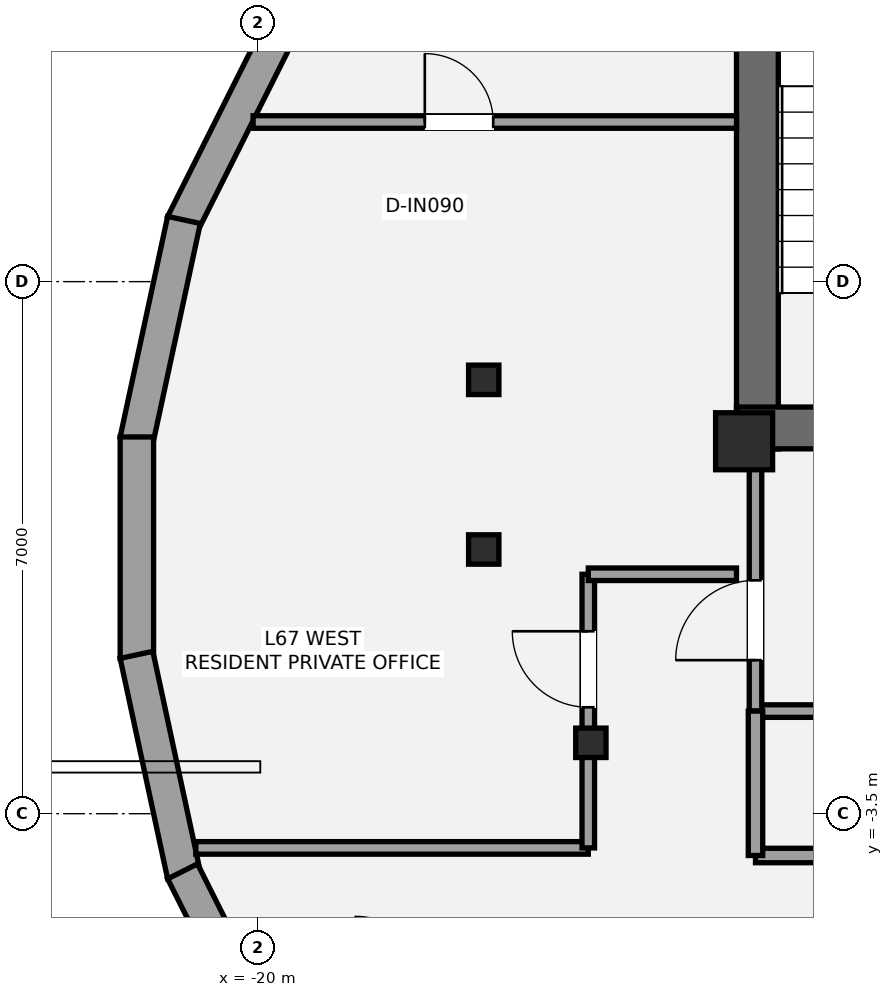
"""IFC4 building model, lengths in metres.
Left out: names, types, materials, properties, quantities, classifications, styles, units other than length and angle.
Written with IfcOpenShell. Run it as: python <this file> out.ifc"""

import sys

from ifc_helpers import new_model, si_unit, direction, frame, frame_2d, origin, origin_2d, place, context, subcontext, project, spatial, rectangle, i_section, extrude, element, fill, save


model = new_model("IFC4")
c1 = context("Model", 3, precision=1e-05, world=origin(), true_north=direction((0.0, 1.0)))
c2 = subcontext(c1, "Body", "Model", "MODEL_VIEW")
j1 = project(units=[si_unit("LENGTHUNIT", "METRE"), si_unit("PLANEANGLEUNIT", "RADIAN")], contexts=[c1])
p1 = place(None, origin())
s1 = spatial("IfcSite", under=j1, at=p1, CompositionType="ELEMENT")
p2 = place(p1, origin())
s2 = spatial("IfcBuilding", under=s1, at=p2, CompositionType="ELEMENT")
p3 = place(p2, frame((0.0, 0.0, 238.35)))
s3 = spatial("IfcBuildingStorey", under=s2, at=p3, CompositionType="ELEMENT", Elevation=238.35)
p4 = place(p3, frame((-13.425, 1.3, 0.0), z_axis=(0.0, 0.0, 1.0), x_axis=(0.0, 1.0, 0.0)))
e1 = element("IfcWall", 1, at=p4, inside=s3, PredefinedType="SHEAR", context=c2, shape_type="SweptSolid", body=[
    extrude(rectangle(XDim=8.25, YDim=0.55, at=frame_2d((4.125, 0.0))), origin(), (0.0, 0.0, 1.0), 3.15),
])
p5 = place(p3, frame((-4.925, 1.575, 0.0), z_axis=(0.0, 0.0, 1.0), x_axis=(-1.0, 0.0, 0.0)))
e2 = element("IfcWall", 2, at=p5, inside=s3, PredefinedType="SHEAR", context=c2, shape_type="SweptSolid", body=[
    extrude(rectangle(XDim=8.775, YDim=0.55, at=frame_2d((4.387, 0.0))), origin(), (0.0, 0.0, 1.0), 3.15),
])
p6 = place(p5, frame((5.375, 0.0, 0.0)))
e3 = element("IfcOpeningElement", 3, at=p6, cuts=e2, PredefinedType="OPENING", context=c2, shape_type="SweptSolid", body=[
    extrude(rectangle(XDim=1.05, YDim=2.15, at=frame_2d((0.525, 1.075))), frame((0.0, 0.285, 0.0), z_axis=(0.0, -1.0, 0.0), x_axis=(1.0, 0.0, 0.0)), (0.0, 0.0, 1.0), 0.57),
])
p7 = place(p5, frame((3.705, 0.0, 0.0)))
e4 = element("IfcOpeningElement", 4, at=p7, cuts=e2, PredefinedType="OPENING", context=c2, shape_type="SweptSolid", body=[
    extrude(rectangle(XDim=1.1, YDim=2.2, at=frame_2d((0.55, 1.1))), frame((0.0, 0.285, 0.0), z_axis=(0.0, -1.0, 0.0), x_axis=(1.0, 0.0, 0.0)), (0.0, 0.0, 1.0), 0.57),
])
p8 = place(p3, frame((-13.6, 1.4, 0.0), z_axis=(0.0, 0.0, 1.0), x_axis=(1.0, 0.0, 0.0)))
e5 = element("IfcColumn", 5, at=p8, inside=s3, PredefinedType="PILASTER", context=c2, shape_type="SweptSolid", body=[
    extrude(rectangle(XDim=0.75, YDim=0.75, at=origin_2d()), origin(), (0.0, 0.0, 1.0), 3.15),
])
for number, where, z_axis, x_axis in (
    (6, (-17.026, 2.208, 0.0), (0.0, 0.0, 1.0), (1.0, 0.0, 0.0)),
    (7, (-17.026, -0.024, 0.0), (0.0, 0.0, 1.0), (1.0, 0.0, 0.0)),
    (8, (-15.616, -2.567, 0.0), (0.0, 0.0, 1.0), (1.0, 0.0, 0.0)),
):
    element("IfcColumn", number, at=place(p3, frame(where, z_axis=z_axis, x_axis=x_axis)), inside=s3, PredefinedType="COLUMN", context=c2, shape_type="SweptSolid", body=[
        extrude(i_section(OverallWidth=0.399, OverallDepth=0.387, WebThickness=0.021, FlangeThickness=0.033, at=origin_2d()), origin(), (0.0, 0.0, 1.0), 3.15),
    ])
p9 = place(p3, frame((-20.988, 4.259, 0.0), z_axis=(0.0, 0.0, 1.0), x_axis=(0.448424724145, 0.893820601002, 0.0)))
e9 = element("IfcWall", 9, at=p9, inside=s3, PredefinedType="STANDARD", context=c2, shape_type="SweptSolid", body=[
    extrude(rectangle(XDim=3.144, YDim=0.44, at=frame_2d((1.572, 0.0))), origin(), (0.0, 0.0, 1.0), 2.336),
])
p10 = place(p3, frame((-21.594, 1.41, 0.0), z_axis=(0.0, 0.0, 1.0), x_axis=(0.210540350534, 0.977585168053, 0.0)))
e10 = element("IfcWall", 10, at=p10, inside=s3, PredefinedType="STANDARD", context=c2, shape_type="SweptSolid", body=[
    extrude(rectangle(XDim=2.967, YDim=0.44, at=frame_2d((1.484, 0.0))), origin(), (0.0, 0.0, 1.0), 2.336),
])
p11 = place(p3, frame((-21.589, -1.457, 0.0), z_axis=(0.0, 0.0, 1.0), x_axis=(0.0, 1.0, 0.0)))
e11 = element("IfcWall", 11, at=p11, inside=s3, PredefinedType="STANDARD", context=c2, shape_type="SweptSolid", body=[
    extrude(rectangle(XDim=2.913, YDim=0.44, at=frame_2d((1.457, 0.0))), origin(), (0.0, 0.0, 1.0), 2.336),
])
p12 = place(p3, frame((-20.969, -4.311, 0.0), z_axis=(0.0, 0.0, 1.0), x_axis=(-0.210540350534, 0.977585168053, 0.0)))
e12 = element("IfcWall", 12, at=p12, inside=s3, PredefinedType="STANDARD", context=c2, shape_type="SweptSolid", body=[
    extrude(rectangle(XDim=2.967, YDim=0.44, at=frame_2d((1.484, 0.0))), origin(), (0.0, 0.0, 1.0), 2.336),
])
p13 = place(p3, frame((-19.578, -7.069, 0.0), z_axis=(0.0, 0.0, 1.0), x_axis=(-0.448424724145, 0.893820601002, 0.0)))
e13 = element("IfcWall", 13, at=p13, inside=s3, PredefinedType="STANDARD", context=c2, shape_type="SweptSolid", body=[
    extrude(rectangle(XDim=3.144, YDim=0.44, at=frame_2d((1.572, 0.0))), origin(), (0.0, 0.0, 1.0), 2.336),
])
p14 = place(p3, frame((-13.45, -2.15, 0.0), z_axis=(0.0, 0.0, 1.0), x_axis=(1.0, 0.0, 0.0)))
e14 = element("IfcWall", 14, at=p14, inside=s3, PredefinedType="PARTITIONING", context=c2, shape_type="SweptSolid", body=[
    extrude(rectangle(XDim=6.25, YDim=0.165, at=frame_2d((3.125, 0.0))), origin(), (0.0, 0.0, 1.0), 2.423),
])
p15 = place(p3, frame((-13.45, -2.15, 0.0), z_axis=(0.0, 0.0, 1.0), x_axis=(0.0, 1.0, 0.0)))
e15 = element("IfcWall", 15, at=p15, inside=s3, PredefinedType="PARTITIONING", context=c2, shape_type="SweptSolid", body=[
    extrude(rectangle(XDim=3.5, YDim=0.165, at=frame_2d((1.75, 0.0))), origin(), (0.0, 0.0, 1.0), 2.423),
])
p16 = place(p15, frame((0.67, 0.0, 0.0)))
e16 = element("IfcOpeningElement", 16, at=p16, cuts=e15, PredefinedType="OPENING", context=c2, shape_type="SweptSolid", body=[
    extrude(rectangle(XDim=1.05, YDim=2.15, at=frame_2d((0.525, 1.075))), frame((0.0, 0.093, 0.0), z_axis=(0.0, -1.0, 0.0), x_axis=(1.0, 0.0, 0.0)), (0.0, 0.0, 1.0), 0.185),
])
p17 = place(p3, frame((-13.45, -4.05, 0.0), z_axis=(0.0, 0.0, 1.0), x_axis=(1.0, 0.0, 0.0)))
e17 = element("IfcWall", 17, at=p17, inside=s3, PredefinedType="PLUMBINGWALL", context=c2, shape_type="SweptSolid", body=[
    extrude(rectangle(XDim=11.35, YDim=0.19, at=frame_2d((5.675, 0.0))), origin(), (0.0, 0.0, 1.0), 2.357),
])
p18 = place(p17, frame((1.25, 0.0, 0.0)))
e18 = element("IfcOpeningElement", 18, at=p18, cuts=e17, PredefinedType="OPENING", context=c2, shape_type="SweptSolid", body=[
    extrude(rectangle(XDim=0.85, YDim=2.1, at=frame_2d((0.425, 1.05))), frame((0.0, 0.105, 0.0), z_axis=(0.0, -1.0, 0.0), x_axis=(1.0, 0.0, 0.0)), (0.0, 0.0, 1.0), 0.21),
])
p19 = place(p17, frame((5.1, 0.0, 0.0)))
e19 = element("IfcOpeningElement", 19, at=p19, cuts=e17, PredefinedType="OPENING", context=c2, shape_type="SweptSolid", body=[
    extrude(rectangle(XDim=0.85, YDim=2.1, at=frame_2d((0.425, 1.05))), frame((0.0, 0.105, 0.0), z_axis=(0.0, -1.0, 0.0), x_axis=(1.0, 0.0, 0.0)), (0.0, 0.0, 1.0), 0.21),
])
p20 = place(p17, frame((8.95, 0.0, 0.0)))
e20 = element("IfcOpeningElement", 20, at=p20, cuts=e17, PredefinedType="OPENING", context=c2, shape_type="SweptSolid", body=[
    extrude(rectangle(XDim=0.95, YDim=2.15, at=frame_2d((0.475, 1.075))), frame((0.0, 0.105, 0.0), z_axis=(0.0, -1.0, 0.0), x_axis=(1.0, 0.0, 0.0)), (0.0, 0.0, 1.0), 0.21),
])
p21 = place(p3, frame((-13.45, -4.05, 0.0), z_axis=(0.0, 0.0, 1.0), x_axis=(0.0, 1.0, 0.0)))
e21 = element("IfcWall", 21, at=p21, inside=s3, PredefinedType="PLUMBINGWALL", context=c2, shape_type="SweptSolid", body=[
    extrude(rectangle(XDim=1.9, YDim=0.19, at=frame_2d((0.95, 0.0))), origin(), (0.0, 0.0, 1.0), 2.423),
])
p22 = place(p3, frame((-20.814, -3.95, 0.0), z_axis=(0.0, 0.0, 1.0), x_axis=(1.0, 0.0, 0.0)))
e22 = element("IfcWall", 22, at=p22, inside=s3, PredefinedType="PARTITIONING", context=c2, shape_type="SweptSolid", body=[
    extrude(rectangle(XDim=5.164, YDim=0.165, at=frame_2d((2.582, 0.0))), origin(), (0.0, 0.0, 1.0), 2.423),
])
p23 = place(p3, frame((-15.65, -3.95, 0.0), z_axis=(0.0, 0.0, 1.0), x_axis=(0.0, 1.0, 0.0)))
e23 = element("IfcWall", 23, at=p23, inside=s3, PredefinedType="PARTITIONING", context=c2, shape_type="SweptSolid", body=[
    extrude(rectangle(XDim=3.6, YDim=0.165, at=frame_2d((1.8, 0.0))), origin(), (0.0, 0.0, 1.0), 2.357),
])
p24 = place(p23, frame((1.85, 0.0, 0.0)))
e24 = element("IfcOpeningElement", 24, at=p24, cuts=e23, PredefinedType="OPENING", context=c2, shape_type="SweptSolid", body=[
    extrude(rectangle(XDim=1.0, YDim=2.15, at=frame_2d((0.5, 1.075))), frame((0.0, 0.093, 0.0), z_axis=(0.0, -1.0, 0.0), x_axis=(1.0, 0.0, 0.0)), (0.0, 0.0, 1.0), 0.185),
])
p25 = place(p3, frame((-15.65, -0.35, 0.0), z_axis=(0.0, 0.0, 1.0), x_axis=(1.0, 0.0, 0.0)))
e25 = element("IfcWall", 25, at=p25, inside=s3, PredefinedType="PARTITIONING", context=c2, shape_type="SweptSolid", body=[
    extrude(rectangle(XDim=1.95, YDim=0.165, at=frame_2d((0.975, 0.0))), origin(), (0.0, 0.0, 1.0), 2.97),
])
p26 = place(p3, frame((-20.06, 5.6, 0.0), z_axis=(0.0, 0.0, 1.0), x_axis=(1.0, 0.0, 0.0)))
e26 = element("IfcWall", 26, at=p26, inside=s3, PredefinedType="PARTITIONING", context=c2, shape_type="SweptSolid", body=[
    extrude(rectangle(XDim=6.36, YDim=0.165, at=frame_2d((3.18, 0.0))), origin(), (0.0, 0.0, 1.0), 2.423),
])
p27 = place(p26, frame((2.259, 0.0, 0.0)))
e27 = element("IfcOpeningElement", 27, at=p27, cuts=e26, PredefinedType="OPENING", context=c2, shape_type="SweptSolid", body=[
    extrude(rectangle(XDim=0.9, YDim=2.1, at=frame_2d((0.45, 1.05))), frame((0.0, 0.093, 0.0), z_axis=(0.0, -1.0, 0.0), x_axis=(1.0, 0.0, 0.0)), (0.0, 0.0, 1.0), 0.185),
])
p28 = place(p16, origin())
e28 = element("IfcDoor", 28, at=p28, inside=s3, OperationType="SINGLE_SWING_LEFT", PredefinedType="DOOR", context=c2, shape_type="SweptSolid", body=[
    extrude(rectangle(XDim=1.05, YDim=2.15, at=frame_2d((0.525, 1.075))), frame((0.0, 0.025, 0.0), z_axis=(0.0, -1.0, 0.0), x_axis=(1.0, 0.0, 0.0)), (0.0, 0.0, 1.0), 0.05),
])
fill(e16, e28)
p29 = place(p24, origin())
e29 = element("IfcDoor", 29, at=p29, inside=s3, OperationType="SINGLE_SWING_RIGHT", PredefinedType="DOOR", context=c2, shape_type="SweptSolid", body=[
    extrude(rectangle(XDim=1.0, YDim=2.15, at=frame_2d((0.5, 1.075))), frame((0.0, 0.025, 0.0), z_axis=(0.0, -1.0, 0.0), x_axis=(1.0, 0.0, 0.0)), (0.0, 0.0, 1.0), 0.05),
])
fill(e24, e29)
p30 = place(p27, origin())
e30 = element("IfcDoor", 30, at=p30, inside=s3, OperationType="SINGLE_SWING_LEFT", PredefinedType="DOOR", context=c2, shape_type="SweptSolid", body=[
    extrude(rectangle(XDim=0.9, YDim=2.1, at=frame_2d((0.45, 1.05))), frame((0.0, 0.025, 0.0), z_axis=(0.0, -1.0, 0.0), x_axis=(1.0, 0.0, 0.0)), (0.0, 0.0, 1.0), 0.05),
])
fill(e27, e30)
save(model, sys.argv[1])
